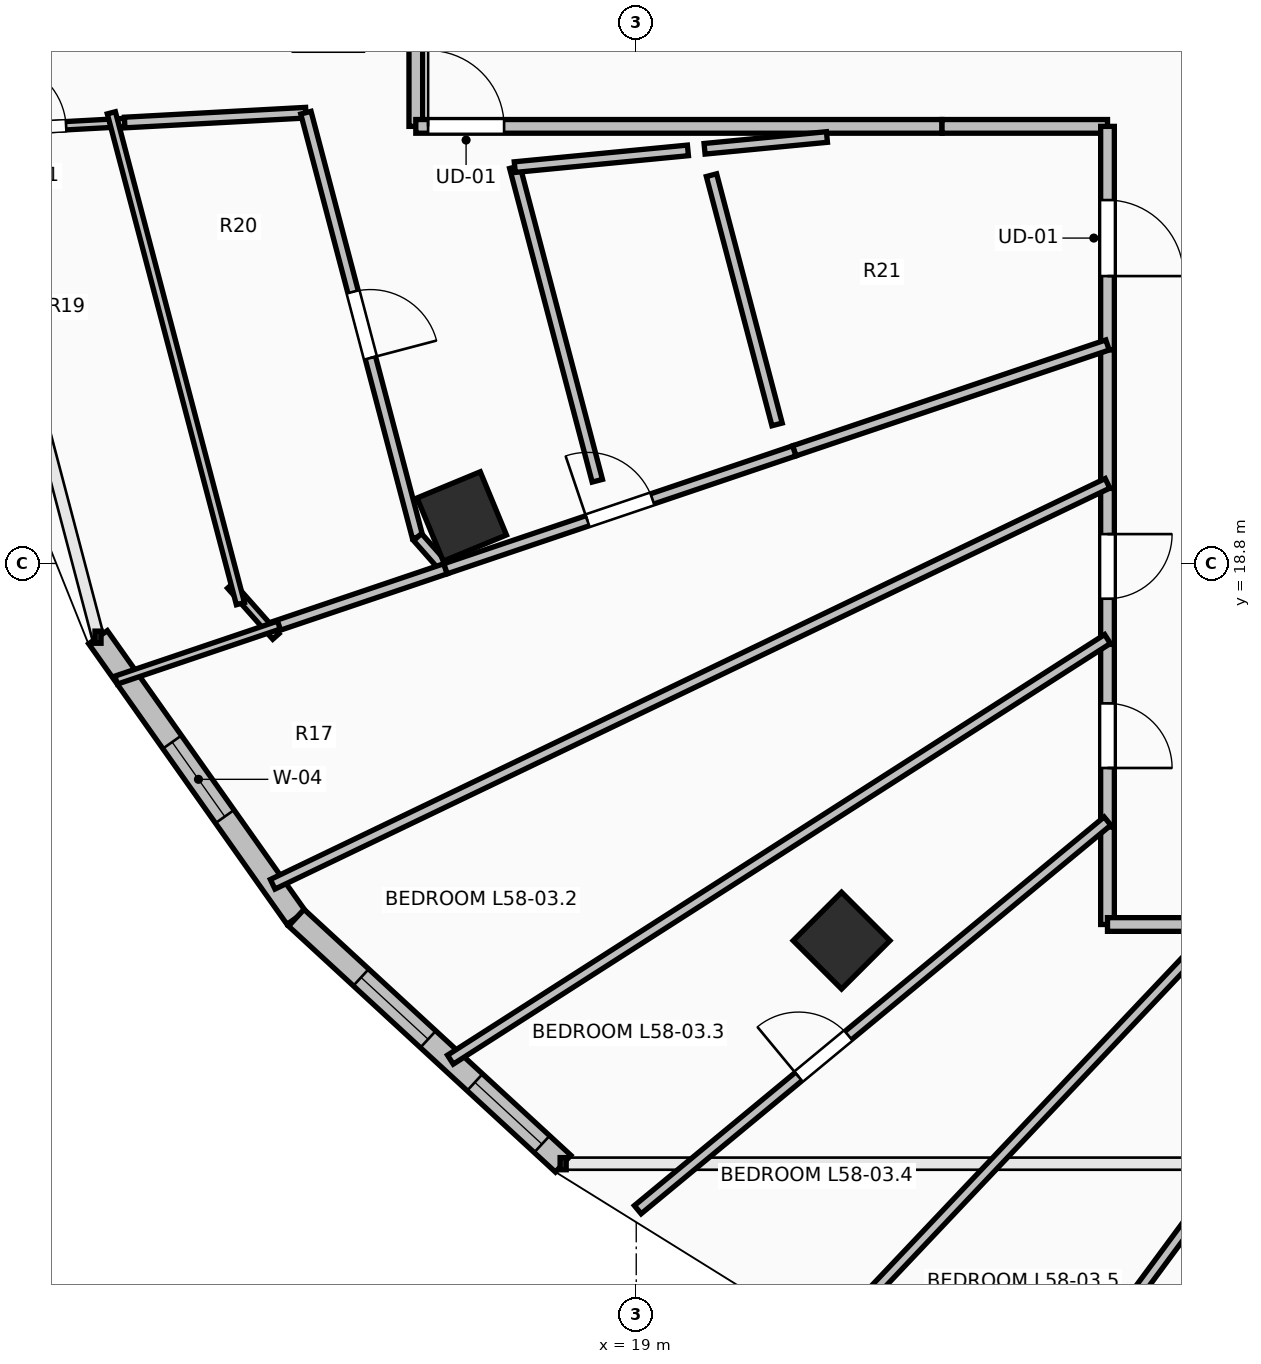
"""IFC4 building model, lengths in metres.
Left out: names, types, materials, properties, quantities, classifications, styles, units other than length and angle.
Written with IfcOpenShell. Run it as: python <this file> out.ifc"""

import sys

from ifc_helpers import new_model, si_unit, direction, frame, frame_2d, origin, origin_2d, place, context, subcontext, project, spatial, rectangle, extrude, element, fill, save


model = new_model("IFC4")
c1 = context("Model", 3, precision=1e-05, world=origin(), true_north=direction((0.0, 1.0)))
c2 = subcontext(c1, "Body", "Model", "MODEL_VIEW")
j1 = project(units=[si_unit("LENGTHUNIT", "METRE"), si_unit("PLANEANGLEUNIT", "RADIAN")], contexts=[c1])
p1 = place(None, origin())
s1 = spatial("IfcSite", under=j1, at=p1, CompositionType="ELEMENT")
p2 = place(p1, origin())
s2 = spatial("IfcBuilding", under=s1, at=p2, CompositionType="ELEMENT")
p3 = place(p2, frame((0.0, 0.0, 214.3)))
s3 = spatial("IfcBuildingStorey", under=s2, at=p3, CompositionType="ELEMENT", Elevation=214.3)
for number, where, z_axis, x_axis in (
    (1, (16.705, 19.418, 0.0), (0.0, 0.0, 1.0), (-0.924, -0.383, 0.0)),
    (2, (21.701, 13.838, 0.0), (0.0, 0.0, 1.0), (-0.707, -0.707, 0.0)),
):
    element("IfcColumn", number, at=place(p3, frame(where, z_axis=z_axis, x_axis=x_axis)), inside=s3, PredefinedType="COLUMN", context=c2, shape_type="SweptSolid", body=[
        extrude(rectangle(XDim=0.9, YDim=0.9, at=origin_2d()), origin(), (0.0, 0.0, 1.0), 3.55),
    ])
p4 = place(p3, frame((11.919, 17.83, 0.0), z_axis=(0.0, 0.0, 1.0), x_axis=(0.577168747264, -0.81662490605, 0.0)))
e3 = element("IfcWall", 3, at=p4, inside=s3, PredefinedType="STANDARD", context=c2, shape_type="SweptSolid", body=[
    extrude(rectangle(XDim=4.52, YDim=0.3, at=frame_2d((2.26, 0.0))), origin(), (0.0, 0.0, 1.0), 3.29),
])
p5 = place(p4, frame((1.69, 0.0, 0.85)))
e4 = element("IfcOpeningElement", 4, at=p5, cuts=e3, PredefinedType="OPENING", context=c2, shape_type="SweptSolid", body=[
    extrude(rectangle(XDim=1.2, YDim=1.95, at=frame_2d((0.6, 0.975))), frame((0.0, 0.165, 0.0), z_axis=(0.0, -1.0, 0.0), x_axis=(1.0, 0.0, 0.0)), (0.0, 0.0, 1.0), 0.33),
])
p6 = place(p3, frame((14.528, 14.139, 0.0), z_axis=(0.0, 0.0, 1.0), x_axis=(0.735359993374, -0.677676678177, 0.0)))
e5 = element("IfcWall", 5, at=p6, inside=s3, PredefinedType="STANDARD", context=c2, shape_type="SweptSolid", body=[
    extrude(rectangle(XDim=4.774, YDim=0.3, at=frame_2d((2.387, 0.0))), origin(), (0.0, 0.0, 1.0), 3.29),
])
p7 = place(p6, frame((1.158, 0.0, 0.85)))
e6 = element("IfcOpeningElement", 6, at=p7, cuts=e5, PredefinedType="OPENING", context=c2, shape_type="SweptSolid", body=[
    extrude(rectangle(XDim=1.2, YDim=1.95, at=frame_2d((0.6, 0.975))), frame((0.0, 0.165, 0.0), z_axis=(0.0, -1.0, 0.0), x_axis=(1.0, 0.0, 0.0)), (0.0, 0.0, 1.0), 0.33),
])
p8 = place(p6, frame((3.195, 0.0, 0.85)))
e7 = element("IfcOpeningElement", 7, at=p8, cuts=e5, PredefinedType="OPENING", context=c2, shape_type="SweptSolid", body=[
    extrude(rectangle(XDim=1.2, YDim=1.95, at=frame_2d((0.6, 0.975))), frame((0.0, 0.165, 0.0), z_axis=(0.0, -1.0, 0.0), x_axis=(1.0, 0.0, 0.0)), (0.0, 0.0, 1.0), 0.33),
])
p9 = place(p3, frame((16.1, 27.25, 0.0), z_axis=(0.0, 0.0, 1.0), x_axis=(0.0, -1.0, 0.0)))
e8 = element("IfcWall", 8, at=p9, inside=s3, PredefinedType="PARTITIONING", context=c2, shape_type="SweptSolid", body=[
    extrude(rectangle(XDim=2.7, YDim=0.18, at=frame_2d((1.35, 0.0))), origin(), (0.0, 0.0, 1.0), 2.482),
])
p10 = place(p3, frame((16.1, 24.55, 0.0), z_axis=(0.0, 0.0, 1.0), x_axis=(1.0, 0.0, 0.0)))
e9 = element("IfcWall", 9, at=p10, inside=s3, PredefinedType="PARTITIONING", context=c2, shape_type="SweptSolid", body=[
    extrude(rectangle(XDim=6.923, YDim=0.18, at=frame_2d((3.461, 0.0))), origin(), (0.0, 0.0, 1.0), 2.936),
])
p11 = place(p10, frame((0.162, 0.0, 0.0)))
e10 = element("IfcOpeningElement", 10, at=p11, cuts=e9, PredefinedType="OPENING", context=c2, shape_type="SweptSolid", body=[
    extrude(rectangle(XDim=1.0, YDim=2.15, at=frame_2d((0.5, 1.075))), frame((0.0, 0.105, 0.0), z_axis=(0.0, -1.0, 0.0), x_axis=(1.0, 0.0, 0.0)), (0.0, 0.0, 1.0), 0.21),
])
p12 = place(p3, frame((23.023, 24.55, 0.0), z_axis=(0.0, 0.0, 1.0), x_axis=(1.0, 0.0, 0.0)))
e11 = element("IfcWall", 11, at=p12, inside=s3, PredefinedType="PARTITIONING", context=c2, shape_type="SweptSolid", body=[
    extrude(rectangle(XDim=2.177, YDim=0.18, at=frame_2d((1.088, 0.0))), origin(), (0.0, 0.0, 1.0), 2.979),
])
p13 = place(p3, frame((25.2, 24.55, 0.0), z_axis=(0.0, 0.0, 1.0), x_axis=(0.0, -1.0, 0.0)))
e12 = element("IfcWall", 12, at=p13, inside=s3, PredefinedType="PARTITIONING", context=c2, shape_type="SweptSolid", body=[
    extrude(rectangle(XDim=2.939, YDim=0.18, at=frame_2d((1.469, 0.0))), origin(), (0.0, 0.0, 1.0), 3.29),
])
p14 = place(p13, frame((0.969, 0.0, 0.0)))
e13 = element("IfcOpeningElement", 13, at=p14, cuts=e12, PredefinedType="OPENING", context=c2, shape_type="SweptSolid", body=[
    extrude(rectangle(XDim=1.0, YDim=2.15, at=frame_2d((0.5, 1.075))), frame((0.0, 0.105, 0.0), z_axis=(0.0, -1.0, 0.0), x_axis=(1.0, 0.0, 0.0)), (0.0, 0.0, 1.0), 0.21),
])
p15 = place(p3, frame((25.2, 21.611, 0.0), z_axis=(0.0, 0.0, 1.0), x_axis=(0.0, -1.0, 0.0)))
e14 = element("IfcWall", 14, at=p15, inside=s3, PredefinedType="PARTITIONING", context=c2, shape_type="SweptSolid", body=[
    extrude(rectangle(XDim=1.824, YDim=0.18, at=frame_2d((0.912, 0.0))), origin(), (0.0, 0.0, 1.0), 3.29),
])
p16 = place(p3, frame((25.2, 19.787, 0.0), z_axis=(0.0, 0.0, 1.0), x_axis=(0.0, -1.0, 0.0)))
e15 = element("IfcWall", 15, at=p16, inside=s3, PredefinedType="PARTITIONING", context=c2, shape_type="SweptSolid", body=[
    extrude(rectangle(XDim=2.052, YDim=0.18, at=frame_2d((1.026, 0.0))), origin(), (0.0, 0.0, 1.0), 3.29),
])
p17 = place(p16, frame((0.601, 0.0, 0.0)))
e16 = element("IfcOpeningElement", 16, at=p17, cuts=e15, PredefinedType="OPENING", context=c2, shape_type="SweptSolid", body=[
    extrude(rectangle(XDim=0.85, YDim=2.1, at=frame_2d((0.425, 1.05))), frame((0.0, 0.105, 0.0), z_axis=(0.0, -1.0, 0.0), x_axis=(1.0, 0.0, 0.0)), (0.0, 0.0, 1.0), 0.21),
])
p18 = place(p3, frame((25.2, 17.735, 0.0), z_axis=(0.0, 0.0, 1.0), x_axis=(0.0, -1.0, 0.0)))
e17 = element("IfcWall", 17, at=p18, inside=s3, PredefinedType="PARTITIONING", context=c2, shape_type="SweptSolid", body=[
    extrude(rectangle(XDim=2.402, YDim=0.18, at=frame_2d((1.201, 0.0))), origin(), (0.0, 0.0, 1.0), 2.482),
])
p19 = place(p18, frame((0.776, 0.0, 0.0)))
e18 = element("IfcOpeningElement", 18, at=p19, cuts=e17, PredefinedType="OPENING", context=c2, shape_type="SweptSolid", body=[
    extrude(rectangle(XDim=0.85, YDim=2.1, at=frame_2d((0.425, 1.05))), frame((0.0, 0.105, 0.0), z_axis=(0.0, -1.0, 0.0), x_axis=(1.0, 0.0, 0.0)), (0.0, 0.0, 1.0), 0.21),
])
p20 = place(p3, frame((25.2, 15.333, 0.0), z_axis=(0.0, 0.0, 1.0), x_axis=(0.0, -1.0, 0.0)))
e19 = element("IfcWall", 19, at=p20, inside=s3, PredefinedType="PARTITIONING", context=c2, shape_type="SweptSolid", body=[
    extrude(rectangle(XDim=1.283, YDim=0.18, at=frame_2d((0.642, 0.0))), origin(), (0.0, 0.0, 1.0), 2.482),
])
p21 = place(p3, frame((25.2, 14.05, 0.0), z_axis=(0.0, 0.0, 1.0), x_axis=(1.0, 0.0, 0.0)))
e20 = element("IfcWall", 20, at=p21, inside=s3, PredefinedType="PARTITIONING", context=c2, shape_type="SweptSolid", body=[
    extrude(rectangle(XDim=1.55, YDim=0.18, at=frame_2d((0.775, 0.0))), origin(), (0.0, 0.0, 1.0), 2.936),
])
p22 = place(p3, frame((19.899, 24.255, 0.0), z_axis=(0.0, 0.0, 1.0), x_axis=(0.995395189956, 0.095856224692, 0.0)))
e21 = element("IfcWall", 21, at=p22, inside=s3, PredefinedType="PARTITIONING", context=c2, shape_type="SweptSolid", body=[
    extrude(rectangle(XDim=1.617, YDim=0.14, at=frame_2d((0.809, 0.0))), origin(), (0.0, 0.0, 1.0), 2.936),
])
p23 = place(p3, frame((21.079, 20.281, 0.0), z_axis=(0.0, 0.0, 1.0), x_axis=(0.947333376301, 0.320249081413, 0.0)))
e22 = element("IfcWall", 22, at=p23, inside=s3, PredefinedType="PARTITIONING", context=c2, shape_type="SweptSolid", body=[
    extrude(rectangle(XDim=4.35, YDim=0.14, at=frame_2d((2.175, 0.0))), origin(), (0.0, 0.0, 1.0), 2.979),
])
p24 = place(p3, frame((9.83, 24.467, 0.0), z_axis=(0.0, 0.0, 1.0), x_axis=(0.998510664793, 0.054556872108, 0.0)))
e23 = element("IfcWall", 23, at=p24, inside=s3, PredefinedType="PARTITIONING", context=c2, shape_type="SweptSolid", body=[
    extrude(rectangle(XDim=2.443, YDim=0.11, at=frame_2d((1.222, 0.0))), origin(), (0.0, 0.0, 1.0), 3.29),
])
p25 = place(p24, frame((0.771, 0.0, 0.0)))
e24 = element("IfcOpeningElement", 24, at=p25, cuts=e23, PredefinedType="OPENING", context=c2, shape_type="SweptSolid", body=[
    extrude(rectangle(XDim=0.9, YDim=2.1, at=frame_2d((0.45, 1.05))), frame((0.0, 0.07, 0.0), z_axis=(0.0, -1.0, 0.0), x_axis=(1.0, 0.0, 0.0)), (0.0, 0.0, 1.0), 0.14),
])
p26 = place(p3, frame((12.27, 24.601, 0.0), z_axis=(0.0, 0.0, 1.0), x_axis=(0.998530633022, 0.054190173613, 0.0)))
e25 = element("IfcWall", 25, at=p26, inside=s3, PredefinedType="PARTITIONING", context=c2, shape_type="SweptSolid", body=[
    extrude(rectangle(XDim=2.388, YDim=0.14, at=frame_2d((1.194, 0.0))), origin(), (0.0, 0.0, 1.0), 3.29),
])
p27 = place(p3, frame((14.654, 24.73, 0.0), z_axis=(0.0, 0.0, 1.0), x_axis=(0.254457911505, -0.967083849143, 0.0)))
e26 = element("IfcWall", 26, at=p27, inside=s3, PredefinedType="PARTITIONING", context=c2, shape_type="SweptSolid", body=[
    extrude(rectangle(XDim=5.773, YDim=0.14, at=frame_2d((2.886, 0.0))), origin(), (0.0, 0.0, 1.0), 3.29),
])
p28 = place(p27, frame((2.437, 0.0, 0.0)))
e27 = element("IfcOpeningElement", 27, at=p28, cuts=e26, PredefinedType="OPENING", context=c2, shape_type="SweptSolid", body=[
    extrude(rectangle(XDim=0.9, YDim=2.1, at=frame_2d((0.45, 1.05))), frame((0.0, 0.085, 0.0), z_axis=(0.0, -1.0, 0.0), x_axis=(1.0, 0.0, 0.0)), (0.0, 0.0, 1.0), 0.17),
])
p29 = place(p3, frame((16.123, 19.147, 0.0), z_axis=(0.0, 0.0, 1.0), x_axis=(0.661607116759, -0.749850667169, 0.0)))
e28 = element("IfcWall", 28, at=p29, inside=s3, PredefinedType="PARTITIONING", context=c2, shape_type="SweptSolid", body=[
    extrude(rectangle(XDim=0.556, YDim=0.14, at=frame_2d((0.278, 0.0))), origin(), (0.0, 0.0, 1.0), 3.29),
])
p30 = place(p3, frame((16.491, 18.73, 0.0), z_axis=(0.0, 0.0, 1.0), x_axis=(-0.94734184591, -0.320224026251, 0.0)))
e29 = element("IfcWall", 29, at=p30, inside=s3, PredefinedType="PARTITIONING", context=c2, shape_type="SweptSolid", body=[
    extrude(rectangle(XDim=2.454, YDim=0.14, at=frame_2d((1.227, 0.0))), origin(), (0.0, 0.0, 1.0), 3.29),
])
p31 = place(p3, frame((16.491, 18.73, 0.0), z_axis=(0.0, 0.0, 1.0), x_axis=(0.947333893653, 0.320247551023, 0.0)))
e30 = element("IfcWall", 30, at=p31, inside=s3, PredefinedType="PARTITIONING", context=c2, shape_type="SweptSolid", body=[
    extrude(rectangle(XDim=4.843, YDim=0.14, at=frame_2d((2.422, 0.0))), origin(), (0.0, 0.0, 1.0), 2.482),
])
p32 = place(p31, frame((1.971, 0.0, 0.0)))
e31 = element("IfcOpeningElement", 31, at=p32, cuts=e30, PredefinedType="OPENING", context=c2, shape_type="SweptSolid", body=[
    extrude(rectangle(XDim=0.9, YDim=2.1, at=frame_2d((0.45, 1.05))), frame((0.0, 0.085, 0.0), z_axis=(0.0, -1.0, 0.0), x_axis=(1.0, 0.0, 0.0)), (0.0, 0.0, 1.0), 0.17),
])
p33 = place(p3, frame((14.259, 17.839, 0.0), z_axis=(0.0, 0.0, 1.0), x_axis=(-0.662791157339, 0.748804301372, 0.0)))
e32 = element("IfcWall", 32, at=p33, inside=s3, PredefinedType="PARTITIONING", context=c2, shape_type="SweptSolid", body=[
    extrude(rectangle(XDim=0.897, YDim=0.11, at=frame_2d((0.448, 0.0))), origin(), (0.0, 0.0, 1.0), 3.29),
])
p34 = place(p3, frame((13.792, 18.271, 0.0), z_axis=(0.0, 0.0, 1.0), x_axis=(-0.254286331735, 0.967128978727, 0.0)))
e33 = element("IfcWall", 33, at=p34, inside=s3, PredefinedType="PARTITIONING", context=c2, shape_type="SweptSolid", body=[
    extrude(rectangle(XDim=6.677, YDim=0.11, at=frame_2d((3.339, 0.0))), origin(), (0.0, 0.0, 1.0), 3.29),
])
p35 = place(p3, frame((12.157, 17.265, 0.0), z_axis=(0.0, 0.0, 1.0), x_axis=(0.947357185378, 0.320178642812, 0.0)))
e34 = element("IfcWall", 34, at=p35, inside=s3, PredefinedType="PARTITIONING", context=c2, shape_type="SweptSolid", body=[
    extrude(rectangle(XDim=2.26, YDim=0.11, at=frame_2d((1.13, 0.0))), origin(), (0.0, 0.0, 1.0), 3.29),
])
p36 = place(p3, frame((14.217, 14.579, 0.0), z_axis=(0.0, 0.0, 1.0), x_axis=(0.901423599975, 0.432938209689, 0.0)))
e35 = element("IfcWall", 35, at=p36, inside=s3, PredefinedType="PARTITIONING", context=c2, shape_type="SweptSolid", body=[
    extrude(rectangle(XDim=12.184, YDim=0.14, at=frame_2d((6.092, 0.0))), origin(), (0.0, 0.0, 1.0), 2.482),
])
p37 = place(p3, frame((16.555, 12.272, 0.0), z_axis=(0.0, 0.0, 1.0), x_axis=(0.842221721565, 0.539131312135, 0.0)))
e36 = element("IfcWall", 36, at=p37, inside=s3, PredefinedType="PARTITIONING", context=c2, shape_type="SweptSolid", body=[
    extrude(rectangle(XDim=10.265, YDim=0.14, at=frame_2d((5.132, 0.0))), origin(), (0.0, 0.0, 1.0), 2.482),
])
p38 = place(p3, frame((19.02, 10.298, 0.0), z_axis=(0.0, 0.0, 1.0), x_axis=(0.770494327523, 0.637446853671, 0.0)))
e37 = element("IfcWall", 37, at=p38, inside=s3, PredefinedType="PARTITIONING", context=c2, shape_type="SweptSolid", body=[
    extrude(rectangle(XDim=8.021, YDim=0.14, at=frame_2d((4.01, 0.0))), origin(), (0.0, 0.0, 1.0), 2.482),
])
p39 = place(p38, frame((2.746, 0.0, 0.0)))
e38 = element("IfcOpeningElement", 38, at=p39, cuts=e37, PredefinedType="OPENING", context=c2, shape_type="SweptSolid", body=[
    extrude(rectangle(XDim=0.85, YDim=2.1, at=frame_2d((0.425, 1.05))), frame((0.0, 0.085, 0.0), z_axis=(0.0, -1.0, 0.0), x_axis=(1.0, 0.0, 0.0)), (0.0, 0.0, 1.0), 0.17),
])
p40 = place(p3, frame((21.613, 8.686, 0.0), z_axis=(0.0, 0.0, 1.0), x_axis=(0.68740257318, 0.726276601844, 0.0)))
e39 = element("IfcWall", 39, at=p40, inside=s3, PredefinedType="PARTITIONING", context=c2, shape_type="SweptSolid", body=[
    extrude(rectangle(XDim=7.386, YDim=0.14, at=frame_2d((3.693, 0.0))), origin(), (0.0, 0.0, 1.0), 2.824),
])
p41 = place(p3, frame((24.298, 7.449, 0.0), z_axis=(0.0, 0.0, 1.0), x_axis=(0.594148459094, 0.804355399408, 0.0)))
e40 = element("IfcWall", 40, at=p41, inside=s3, PredefinedType="PARTITIONING", context=c2, shape_type="SweptSolid", body=[
    extrude(rectangle(XDim=8.207, YDim=0.14, at=frame_2d((4.103, 0.0))), origin(), (0.0, 0.0, 1.0), 2.482),
])
p42 = place(p3, frame((18.488, 19.888, 0.0), z_axis=(0.0, 0.0, 1.0), x_axis=(-0.254527099131, 0.967065641933, 0.0)))
e41 = element("IfcWall", 41, at=p42, inside=s3, PredefinedType="PARTITIONING", context=c2, shape_type="SweptSolid", body=[
    extrude(rectangle(XDim=4.267, YDim=0.14, at=frame_2d((2.133, 0.0))), origin(), (0.0, 0.0, 1.0), 3.29),
])
p43 = place(p3, frame((17.402, 24.014, 0.0), z_axis=(0.0, 0.0, 1.0), x_axis=(0.99536946046, 0.096123031498, 0.0)))
e42 = element("IfcWall", 42, at=p43, inside=s3, PredefinedType="PARTITIONING", context=c2, shape_type="SweptSolid", body=[
    extrude(rectangle(XDim=2.288, YDim=0.14, at=frame_2d((1.144, 0.0))), origin(), (0.0, 0.0, 1.0), 2.936),
])
p44 = place(p3, frame((19.99, 23.908, 0.0), z_axis=(0.0, 0.0, 1.0), x_axis=(0.25452874074, -0.967065209868, 0.0)))
e43 = element("IfcWall", 43, at=p44, inside=s3, PredefinedType="PARTITIONING", context=c2, shape_type="SweptSolid", body=[
    extrude(rectangle(XDim=3.391, YDim=0.14, at=frame_2d((1.695, 0.0))), origin(), (0.0, 0.0, 1.0), 2.936),
])
p45 = place(p5, origin())
e44 = element("IfcWindow", 44, at=p45, inside=s3, PartitioningType="SINGLE_PANEL", PredefinedType="WINDOW", context=c2, shape_type="SweptSolid", body=[
    extrude(rectangle(XDim=1.2, YDim=1.95, at=frame_2d((0.6, 0.975))), frame((0.0, 0.03, 0.0), z_axis=(0.0, -1.0, 0.0), x_axis=(1.0, 0.0, 0.0)), (0.0, 0.0, 1.0), 0.06),
])
fill(e4, e44)
p46 = place(p7, origin())
e45 = element("IfcWindow", 45, at=p46, inside=s3, PartitioningType="SINGLE_PANEL", PredefinedType="WINDOW", context=c2, shape_type="SweptSolid", body=[
    extrude(rectangle(XDim=1.2, YDim=1.95, at=frame_2d((0.6, 0.975))), frame((0.0, 0.03, 0.0), z_axis=(0.0, -1.0, 0.0), x_axis=(1.0, 0.0, 0.0)), (0.0, 0.0, 1.0), 0.06),
])
fill(e6, e45)
p47 = place(p8, origin())
e46 = element("IfcWindow", 46, at=p47, inside=s3, PartitioningType="SINGLE_PANEL", PredefinedType="WINDOW", context=c2, shape_type="SweptSolid", body=[
    extrude(rectangle(XDim=1.2, YDim=1.95, at=frame_2d((0.6, 0.975))), frame((0.0, 0.03, 0.0), z_axis=(0.0, -1.0, 0.0), x_axis=(1.0, 0.0, 0.0)), (0.0, 0.0, 1.0), 0.06),
])
fill(e7, e46)
p48 = place(p11, origin())
e47 = element("IfcDoor", 47, at=p48, inside=s3, OperationType="SINGLE_SWING_LEFT", PredefinedType="DOOR", context=c2, shape_type="SweptSolid", body=[
    extrude(rectangle(XDim=1.0, YDim=2.15, at=frame_2d((0.5, 1.075))), frame((0.0, 0.025, 0.0), z_axis=(0.0, -1.0, 0.0), x_axis=(1.0, 0.0, 0.0)), (0.0, 0.0, 1.0), 0.05),
])
fill(e10, e47)
p49 = place(p14, origin())
e48 = element("IfcDoor", 48, at=p49, inside=s3, OperationType="SINGLE_SWING_RIGHT", PredefinedType="DOOR", context=c2, shape_type="SweptSolid", body=[
    extrude(rectangle(XDim=1.0, YDim=2.15, at=frame_2d((0.5, 1.075))), frame((0.0, 0.025, 0.0), z_axis=(0.0, -1.0, 0.0), x_axis=(1.0, 0.0, 0.0)), (0.0, 0.0, 1.0), 0.05),
])
fill(e13, e48)
p50 = place(p25, origin())
e49 = element("IfcDoor", 49, at=p50, inside=s3, OperationType="SINGLE_SWING_LEFT", PredefinedType="DOOR", context=c2, shape_type="SweptSolid", body=[
    extrude(rectangle(XDim=0.9, YDim=2.1, at=frame_2d((0.45, 1.05))), frame((0.0, 0.025, 0.0), z_axis=(0.0, -1.0, 0.0), x_axis=(1.0, 0.0, 0.0)), (0.0, 0.0, 1.0), 0.05),
])
fill(e24, e49)
p51 = place(p28, origin())
e50 = element("IfcDoor", 50, at=p51, inside=s3, OperationType="SINGLE_SWING_RIGHT", PredefinedType="DOOR", context=c2, shape_type="SweptSolid", body=[
    extrude(rectangle(XDim=0.9, YDim=2.1, at=frame_2d((0.45, 1.05))), frame((0.0, 0.025, 0.0), z_axis=(0.0, -1.0, 0.0), x_axis=(1.0, 0.0, 0.0)), (0.0, 0.0, 1.0), 0.05),
])
fill(e27, e50)
p52 = place(p32, origin())
e51 = element("IfcDoor", 51, at=p52, inside=s3, OperationType="SINGLE_SWING_LEFT", PredefinedType="DOOR", context=c2, shape_type="SweptSolid", body=[
    extrude(rectangle(XDim=0.9, YDim=2.1, at=frame_2d((0.45, 1.05))), frame((0.0, 0.025, 0.0), z_axis=(0.0, -1.0, 0.0), x_axis=(1.0, 0.0, 0.0)), (0.0, 0.0, 1.0), 0.05),
])
fill(e31, e51)
p53 = place(p17, origin())
e52 = element("IfcDoor", 52, at=p53, inside=s3, OperationType="SINGLE_SWING_LEFT", PredefinedType="DOOR", context=c2, shape_type="SweptSolid", body=[
    extrude(rectangle(XDim=0.85, YDim=2.1, at=frame_2d((0.425, 1.05))), frame((0.0, 0.025, 0.0), z_axis=(0.0, -1.0, 0.0), x_axis=(1.0, 0.0, 0.0)), (0.0, 0.0, 1.0), 0.05),
])
fill(e16, e52)
p54 = place(p19, origin())
e53 = element("IfcDoor", 53, at=p54, inside=s3, OperationType="SINGLE_SWING_RIGHT", PredefinedType="DOOR", context=c2, shape_type="SweptSolid", body=[
    extrude(rectangle(XDim=0.85, YDim=2.1, at=frame_2d((0.425, 1.05))), frame((0.0, 0.025, 0.0), z_axis=(0.0, -1.0, 0.0), x_axis=(1.0, 0.0, 0.0)), (0.0, 0.0, 1.0), 0.05),
])
fill(e18, e53)
p55 = place(p39, origin())
e54 = element("IfcDoor", 54, at=p55, inside=s3, OperationType="SINGLE_SWING_LEFT", PredefinedType="DOOR", context=c2, shape_type="SweptSolid", body=[
    extrude(rectangle(XDim=0.85, YDim=2.1, at=frame_2d((0.425, 1.05))), frame((0.0, 0.025, 0.0), z_axis=(0.0, -1.0, 0.0), x_axis=(1.0, 0.0, 0.0)), (0.0, 0.0, 1.0), 0.05),
])
fill(e38, e54)
save(model, sys.argv[1])
